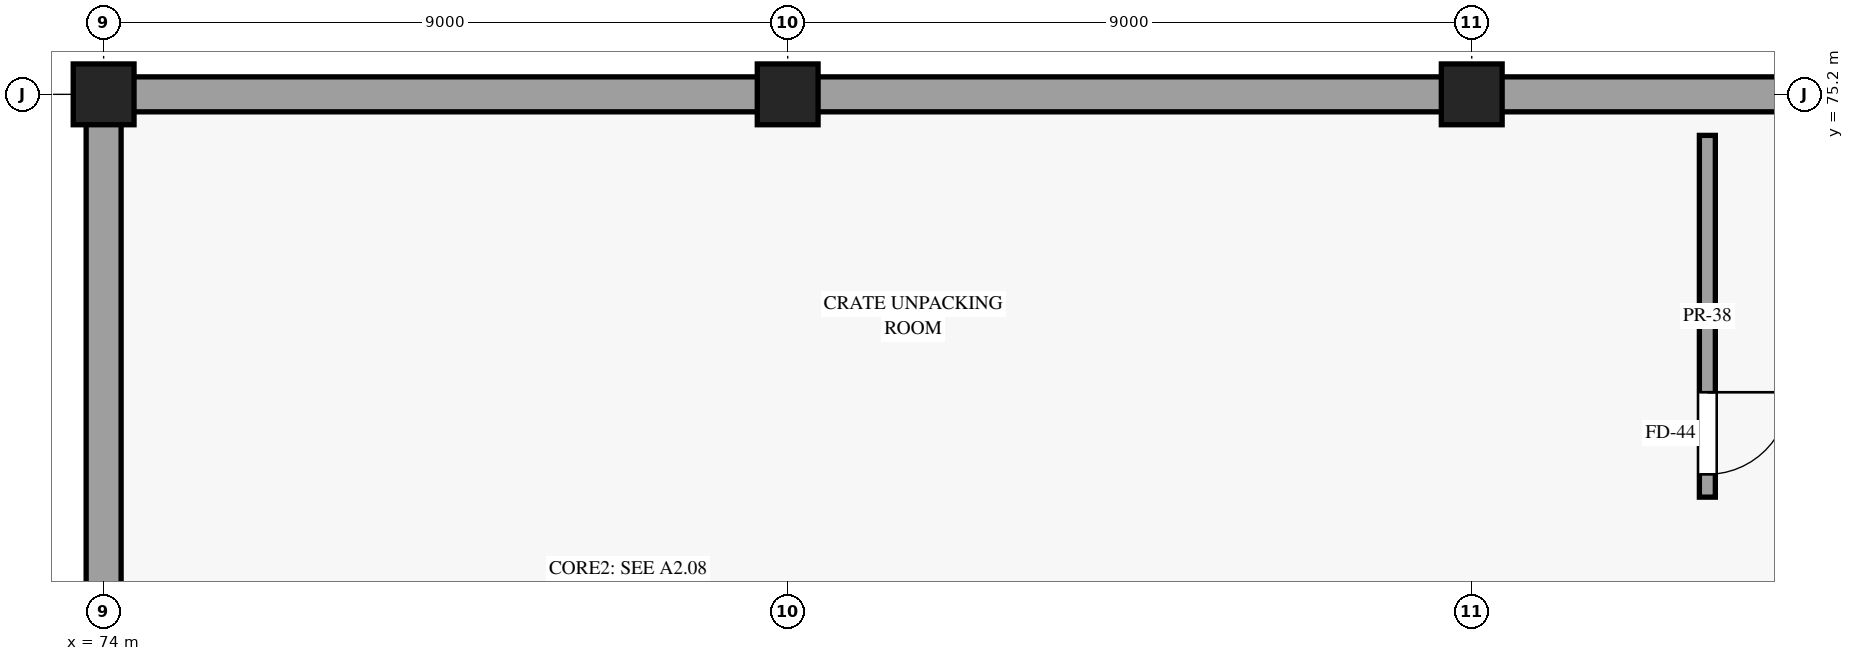
"""IFC4 building model, lengths in metres.
Left out: names, types, materials, properties, quantities, classifications, styles, units other than length and angle.
Written with IfcOpenShell. Run it as: python <this file> out.ifc"""

import sys

from ifc_helpers import new_model, si_unit, direction, frame, frame_2d, origin, origin_2d, place, context, subcontext, project, spatial, rectangle, extrude, element, fill, save


model = new_model("IFC4")
c1 = context("Model", 3, precision=1e-05, world=origin(), true_north=direction((0.0, 1.0)))
c2 = subcontext(c1, "Body", "Model", "MODEL_VIEW")
j1 = project(units=[si_unit("LENGTHUNIT", "METRE"), si_unit("PLANEANGLEUNIT", "RADIAN")], contexts=[c1])
p1 = place(None, origin())
s1 = spatial("IfcSite", under=j1, at=p1, CompositionType="ELEMENT")
p2 = place(p1, origin())
s2 = spatial("IfcBuilding", under=s1, at=p2, CompositionType="ELEMENT")
p3 = place(p2, frame((0.0, 0.0, -4.8)))
s3 = spatial("IfcBuildingStorey", under=s2, at=p3, CompositionType="ELEMENT", Elevation=-4.8)
for number, where, z_axis, x_axis in (
    (1, (74.0, 75.2, 0.0), (0.0, 0.0, 1.0), (1.0, 0.0, 0.0)),
    (2, (83.0, 75.2, 0.0), (0.0, 0.0, 1.0), (1.0, 0.0, 0.0)),
    (3, (92.0, 75.2, 0.0), (0.0, 0.0, 1.0), (1.0, 0.0, 0.0)),
):
    element("IfcColumn", number, at=place(p3, frame(where, z_axis=z_axis, x_axis=x_axis)), inside=s3, PredefinedType="COLUMN", context=c2, shape_type="SweptSolid", body=[
        extrude(rectangle(XDim=0.8, YDim=0.8, at=origin_2d()), origin(), (0.0, 0.0, 1.0), 4.8),
    ])
p4 = place(p3, frame((73.77, 75.2, 0.0), z_axis=(0.0, 0.0, 1.0), x_axis=(1.0, 0.0, 0.0)))
e4 = element("IfcWall", 4, at=p4, inside=s3, PredefinedType="SOLIDWALL", context=c2, shape_type="SweptSolid", body=[
    extrude(rectangle(XDim=27.46, YDim=0.46, at=frame_2d((13.73, 0.0))), origin(), (0.0, 0.0, 1.0), 3.215),
])
p5 = place(p3, frame((74.0, 47.6, 0.0), z_axis=(0.0, 0.0, 1.0), x_axis=(0.0, 1.0, 0.0)))
e5 = element("IfcWall", 5, at=p5, inside=s3, PredefinedType="SOLIDWALL", context=c2, shape_type="SweptSolid", body=[
    extrude(rectangle(XDim=27.6, YDim=0.46, at=frame_2d((13.8, 0.0))), origin(), (0.0, 0.0, 1.0), 3.215),
])
p6 = place(p3, frame((95.1, 69.9, 0.0), z_axis=(0.0, 0.0, 1.0), x_axis=(0.0, 1.0, 0.0)))
e6 = element("IfcWall", 6, at=p6, inside=s3, PredefinedType="PARTITIONING", context=c2, shape_type="SweptSolid", body=[
    extrude(rectangle(XDim=4.76, YDim=0.21, at=frame_2d((2.38, 0.0))), origin(), (0.0, 0.0, 1.0), 4.065),
])
p7 = place(p6, frame((1.38, 0.0, 0.0), z_axis=(0.0, 0.0, 1.0), x_axis=(-1.0, 0.0, 0.0)))
e7 = element("IfcOpeningElement", 7, at=p7, cuts=e6, PredefinedType="OPENING", context=c2, shape_type="SweptSolid", body=[
    extrude(rectangle(XDim=1.08, YDim=2.24, at=frame_2d((0.54, 1.12))), frame((0.0, 0.115, 0.0), z_axis=(0.0, -1.0, 0.0), x_axis=(1.0, 0.0, 0.0)), (0.0, 0.0, 1.0), 0.23),
])
p8 = place(p7, origin())
e8 = element("IfcDoor", 8, at=p8, inside=s3, OperationType="SINGLE_SWING_LEFT", PredefinedType="DOOR", context=c2, shape_type="SweptSolid", body=[
    extrude(rectangle(XDim=1.08, YDim=2.24, at=frame_2d((0.54, 1.12))), frame((0.0, 0.025, 0.0), z_axis=(0.0, -1.0, 0.0), x_axis=(1.0, 0.0, 0.0)), (0.0, 0.0, 1.0), 0.05),
])
fill(e7, e8)
save(model, sys.argv[1])
